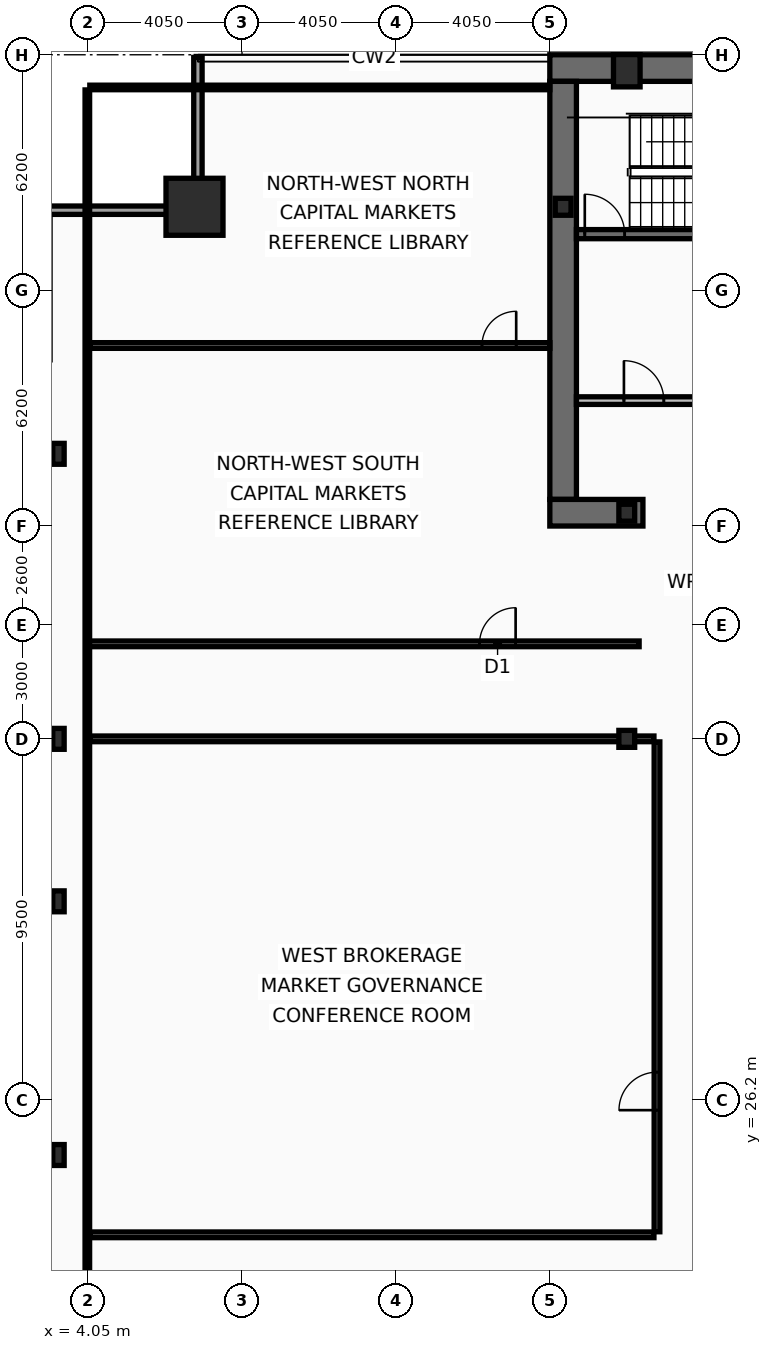
"""IFC4 building model, lengths in metres.
Left out: names, types, materials, properties, quantities, classifications, styles, units other than length and angle.
Written with IfcOpenShell. Run it as: python <this file> out.ifc"""

import sys

from ifc_helpers import new_model, si_unit, direction, frame, frame_2d, origin, origin_2d, place, context, subcontext, project, spatial, rectangle, hollow_rectangle, i_section, extrude, element, fill, save


model = new_model("IFC4")
c1 = context("Model", 3, precision=1e-05, world=origin(), true_north=direction((0.0, 1.0)))
c2 = subcontext(c1, "Body", "Model", "MODEL_VIEW")
j1 = project(units=[si_unit("LENGTHUNIT", "METRE"), si_unit("PLANEANGLEUNIT", "RADIAN")], contexts=[c1])
p1 = place(None, origin())
s1 = spatial("IfcSite", under=j1, at=p1, CompositionType="ELEMENT")
p2 = place(p1, origin())
s2 = spatial("IfcBuilding", under=s1, at=p2, CompositionType="ELEMENT")
p3 = place(p2, frame((0.0, 0.0, 121.8)))
s3 = spatial("IfcBuildingStorey", under=s2, at=p3, CompositionType="ELEMENT", Elevation=121.8)
p4 = place(p3, frame((16.2, 53.35, 0.0), z_axis=(0.0, 0.0, 1.0), x_axis=(1.0, 0.0, 0.0)))
e1 = element("IfcWall", 1, at=p4, inside=s3, PredefinedType="SHEAR", context=c2, shape_type="SweptSolid", body=[
    extrude(rectangle(XDim=40.5, YDim=0.7, at=frame_2d((20.25, 0.0))), origin(), (0.0, 0.0, 1.0), 3.44),
])
p5 = place(p3, frame((16.55, 42.0, 0.0), z_axis=(0.0, 0.0, 1.0), x_axis=(0.0, 1.0, 0.0)))
e2 = element("IfcWall", 2, at=p5, inside=s3, PredefinedType="SHEAR", context=c2, shape_type="SweptSolid", body=[
    extrude(rectangle(XDim=11.0, YDim=0.7, at=frame_2d((5.5, 0.0))), origin(), (0.0, 0.0, 1.0), 3.44),
])
p6 = place(p3, frame((18.65, 41.65, 0.0), z_axis=(0.0, 0.0, 1.0), x_axis=(-1.0, 0.0, 0.0)))
e3 = element("IfcWall", 3, at=p6, inside=s3, PredefinedType="SHEAR", context=c2, shape_type="SweptSolid", body=[
    extrude(rectangle(XDim=2.45, YDim=0.7, at=frame_2d((1.225, 0.0))), origin(), (0.0, 0.0, 1.0), 3.44),
])
p7 = place(p3, frame((16.9, 48.98, 0.0), z_axis=(0.0, 0.0, 1.0), x_axis=(1.0, 0.0, 0.0)))
e4 = element("IfcWall", 4, at=p7, inside=s3, PredefinedType="SHEAR", context=c2, shape_type="SweptSolid", body=[
    extrude(rectangle(XDim=7.32, YDim=0.24, at=frame_2d((3.66, 0.0))), origin(), (0.0, 0.0, 1.0), 3.44),
])
p8 = place(p7, frame((0.22, 0.0, 0.0)))
e5 = element("IfcOpeningElement", 5, at=p8, cuts=e4, PredefinedType="OPENING", context=c2, shape_type="SweptSolid", body=[
    extrude(rectangle(XDim=1.05, YDim=2.15, at=frame_2d((0.525, 1.075))), frame((0.0, 0.13, 0.0), z_axis=(0.0, -1.0, 0.0), x_axis=(1.0, 0.0, 0.0)), (0.0, 0.0, 1.0), 0.26),
])
p9 = place(p3, frame((6.85, 49.7, 0.0), z_axis=(0.0, 0.0, 1.0), x_axis=(1.0, 0.0, 0.0)))
e6 = element("IfcColumn", 6, at=p9, inside=s3, PredefinedType="COLUMN", context=c2, shape_type="SweptSolid", body=[
    extrude(hollow_rectangle(XDim=1.5, YDim=1.5, WallThickness=0.07, at=origin_2d()), origin(), (0.0, 0.0, 1.0), 3.6),
])
p10 = place(p3, frame((18.225, 53.28, 0.0), z_axis=(0.0, 0.0, 1.0), x_axis=(1.0, 0.0, 0.0)))
e7 = element("IfcColumn", 7, at=p10, inside=s3, PredefinedType="COLUMN", context=c2, shape_type="SweptSolid", body=[
    extrude(hollow_rectangle(XDim=0.7, YDim=0.85, WallThickness=0.05, at=origin_2d()), origin(), (0.0, 0.0, 1.0), 3.6),
])
for number, where, z_axis, x_axis in (
    (8, (3.27, 24.75, 0.0), (0.0, 0.0, 1.0), (1.0, 0.0, 0.0)),
    (9, (3.27, 31.425, 0.0), (0.0, 0.0, 1.0), (1.0, 0.0, 0.0)),
    (10, (3.27, 35.7, 0.0), (0.0, 0.0, 1.0), (1.0, 0.0, 0.0)),
    (11, (3.27, 43.2, 0.0), (0.0, 0.0, 1.0), (1.0, 0.0, 0.0)),
):
    element("IfcColumn", number, at=place(p3, frame(where, z_axis=z_axis, x_axis=x_axis)), inside=s3, PredefinedType="COLUMN", context=c2, shape_type="SweptSolid", body=[
        extrude(i_section(OverallWidth=0.3, OverallDepth=0.55, WebThickness=0.015, FlangeThickness=0.029, at=origin_2d()), origin(), (0.0, 0.0, 1.0), 3.6),
    ])
for number, where, z_axis, x_axis in (
    (12, (16.55, 49.7, 0.0), (0.0, 0.0, 1.0), (1.0, 0.0, 0.0)),
    (13, (18.225, 35.7, 0.0), (0.0, 0.0, 1.0), (1.0, 0.0, 0.0)),
    (14, (18.225, 41.65, 0.0), (0.0, 0.0, 1.0), (1.0, 0.0, 0.0)),
):
    element("IfcColumn", number, at=place(p3, frame(where, z_axis=z_axis, x_axis=x_axis)), inside=s3, PredefinedType="COLUMN", context=c2, shape_type="SweptSolid", body=[
        extrude(i_section(OverallWidth=0.416, OverallDepth=0.446, WebThickness=0.039, FlangeThickness=0.063, at=origin_2d()), origin(), (0.0, 0.0, 1.0), 3.6),
    ])
p11 = place(p3, frame((2.83, 49.61, 0.0), z_axis=(0.0, 0.0, 1.0), x_axis=(1.0, 0.0, 0.0)))
e15 = element("IfcWall", 15, at=p11, inside=s3, PredefinedType="SOLIDWALL", context=c2, shape_type="SweptSolid", body=[
    extrude(rectangle(XDim=4.22, YDim=0.22, at=frame_2d((2.11, 0.0))), origin(), (0.0, 0.0, 1.0), 2.83),
])
p12 = place(p3, frame((6.94, 49.72, 0.0), z_axis=(0.0, 0.0, 1.0), x_axis=(0.0, 1.0, 0.0)))
e16 = element("IfcWall", 16, at=p12, inside=s3, PredefinedType="SOLIDWALL", context=c2, shape_type="SweptSolid", body=[
    extrude(rectangle(XDim=3.91, YDim=0.22, at=frame_2d((1.955, 0.0))), origin(), (0.0, 0.0, 1.0), 2.83),
])
p13 = place(p3, frame((16.9, 44.6, 0.0), z_axis=(0.0, 0.0, 1.0), x_axis=(1.0, 0.0, 0.0)))
e17 = element("IfcWall", 17, at=p13, inside=s3, PredefinedType="PARTITIONING", context=c2, shape_type="SweptSolid", body=[
    extrude(rectangle(XDim=4.1, YDim=0.2, at=frame_2d((2.05, 0.0))), origin(), (0.0, 0.0, 1.0), 3.44),
])
p14 = place(p13, frame((1.25, 0.0, 0.0)))
e18 = element("IfcOpeningElement", 18, at=p14, cuts=e17, PredefinedType="OPENING", context=c2, shape_type="SweptSolid", body=[
    extrude(rectangle(XDim=1.05, YDim=2.15, at=frame_2d((0.525, 1.075))), frame((0.0, 0.11, 0.0), z_axis=(0.0, -1.0, 0.0), x_axis=(1.0, 0.0, 0.0)), (0.0, 0.0, 1.0), 0.22),
])
p15 = place(p3, frame((4.03, 38.2, 0.0), z_axis=(0.0, 0.0, 1.0), x_axis=(1.0, 0.0, 0.0)))
e19 = element("IfcWall", 19, at=p15, inside=s3, PredefinedType="PARTITIONING", context=c2, shape_type="SweptSolid", body=[
    extrude(rectangle(XDim=14.52, YDim=0.15, at=frame_2d((7.26, 0.0))), origin(), (0.0, 0.0, 1.0), 2.73),
])
p16 = place(p15, frame((10.32, 0.0, 0.0)))
e20 = element("IfcOpeningElement", 20, at=p16, cuts=e19, PredefinedType="OPENING", context=c2, shape_type="SweptSolid", body=[
    extrude(rectangle(XDim=0.95, YDim=2.05, at=frame_2d((0.475, 1.025))), frame((0.0, 0.085, 0.0), z_axis=(0.0, -1.0, 0.0), x_axis=(1.0, 0.0, 0.0)), (0.0, 0.0, 1.0), 0.17),
])
p17 = place(p3, frame((4.095, 46.05, 0.0), z_axis=(0.0, 0.0, 1.0), x_axis=(1.0, 0.0, 0.0)))
e21 = element("IfcWall", 21, at=p17, inside=s3, PredefinedType="PARTITIONING", context=c2, shape_type="SweptSolid", body=[
    extrude(rectangle(XDim=12.105, YDim=0.15, at=frame_2d((6.052, 0.0))), origin(), (0.0, 0.0, 1.0), 2.83),
])
p18 = place(p17, frame((10.32, 0.0, 0.0)))
e22 = element("IfcOpeningElement", 22, at=p18, cuts=e21, PredefinedType="OPENING", context=c2, shape_type="SweptSolid", body=[
    extrude(rectangle(XDim=0.9, YDim=2.05, at=frame_2d((0.45, 1.025))), frame((0.0, 0.085, 0.0), z_axis=(0.0, -1.0, 0.0), x_axis=(1.0, 0.0, 0.0)), (0.0, 0.0, 1.0), 0.17),
])
p19 = place(p3, frame((19.02, 22.73, 0.0), z_axis=(0.0, 0.0, 1.0), x_axis=(0.0, 1.0, 0.0)))
e23 = element("IfcWall", 23, at=p19, inside=s3, PredefinedType="PARTITIONING", context=c2, shape_type="SweptSolid", body=[
    extrude(rectangle(XDim=12.89, YDim=0.15, at=frame_2d((6.445, 0.0))), origin(), (0.0, 0.0, 1.0), 2.88),
])
p20 = place(p19, frame((3.2, 0.0, 0.0)))
e24 = element("IfcOpeningElement", 24, at=p20, cuts=e23, PredefinedType="OPENING", context=c2, shape_type="SweptSolid", body=[
    extrude(rectangle(XDim=1.0, YDim=2.05, at=frame_2d((0.5, 1.025))), frame((0.0, 0.085, 0.0), z_axis=(0.0, -1.0, 0.0), x_axis=(1.0, 0.0, 0.0)), (0.0, 0.0, 1.0), 0.17),
])
for number, where, z_axis, x_axis in (
    (25, (4.095, 22.65, 0.0), (0.0, 0.0, 1.0), (1.0, 0.0, 0.0)),
    (26, (4.095, 35.7, 0.0), (0.0, 0.0, 1.0), (1.0, 0.0, 0.0)),
):
    element("IfcWall", number, at=place(p3, frame(where, z_axis=z_axis, x_axis=x_axis)), inside=s3, PredefinedType="PARTITIONING", context=c2, shape_type="SweptSolid", body=[
        extrude(rectangle(XDim=14.845, YDim=0.15, at=frame_2d((7.422, 0.0))), origin(), (0.0, 0.0, 1.0), 2.73),
    ])
p21 = place(p3, frame((4.03, 10.665, 0.0), z_axis=(0.0, 0.0, 1.0), x_axis=(0.0, 1.0, 0.0)))
e27 = element("IfcWall", 27, at=p21, inside=s3, PredefinedType="PARTITIONING", context=c2, shape_type="SweptSolid", body=[
    extrude(rectangle(XDim=42.11, YDim=0.12, at=frame_2d((21.055, 0.0))), origin(), (0.0, 0.0, 1.0), 2.73),
])
p22 = place(p3, frame((4.095, 52.84, 0.0), z_axis=(0.0, 0.0, 1.0), x_axis=(1.0, 0.0, 0.0)))
e28 = element("IfcWall", 28, at=p22, inside=s3, PredefinedType="PARTITIONING", context=c2, shape_type="SweptSolid", body=[
    extrude(rectangle(XDim=12.105, YDim=0.12, at=frame_2d((6.052, 0.0))), origin(), (0.0, 0.0, 1.0), 3.44),
])
p23 = place(p8, origin())
e29 = element("IfcDoor", 29, at=p23, inside=s3, OperationType="SINGLE_SWING_LEFT", PredefinedType="DOOR", context=c2, shape_type="SweptSolid", body=[
    extrude(rectangle(XDim=1.05, YDim=2.15, at=frame_2d((0.525, 1.075))), frame((0.0, 0.025, 0.0), z_axis=(0.0, -1.0, 0.0), x_axis=(1.0, 0.0, 0.0)), (0.0, 0.0, 1.0), 0.05),
])
fill(e5, e29)
p24 = place(p14, origin())
e30 = element("IfcDoor", 30, at=p24, inside=s3, OperationType="SINGLE_SWING_LEFT", PredefinedType="DOOR", context=c2, shape_type="SweptSolid", body=[
    extrude(rectangle(XDim=1.05, YDim=2.15, at=frame_2d((0.525, 1.075))), frame((0.0, 0.025, 0.0), z_axis=(0.0, -1.0, 0.0), x_axis=(1.0, 0.0, 0.0)), (0.0, 0.0, 1.0), 0.05),
])
fill(e18, e30)
p25 = place(p16, origin())
e31 = element("IfcDoor", 31, at=p25, inside=s3, OperationType="SINGLE_SWING_RIGHT", PredefinedType="DOOR", context=c2, shape_type="SweptSolid", body=[
    extrude(rectangle(XDim=0.95, YDim=2.05, at=frame_2d((0.475, 1.025))), frame((0.0, 0.025, 0.0), z_axis=(0.0, -1.0, 0.0), x_axis=(1.0, 0.0, 0.0)), (0.0, 0.0, 1.0), 0.05),
])
fill(e20, e31)
p26 = place(p18, origin())
e32 = element("IfcDoor", 32, at=p26, inside=s3, OperationType="SINGLE_SWING_RIGHT", PredefinedType="DOOR", context=c2, shape_type="SweptSolid", body=[
    extrude(rectangle(XDim=0.9, YDim=2.05, at=frame_2d((0.45, 1.025))), frame((0.0, 0.025, 0.0), z_axis=(0.0, -1.0, 0.0), x_axis=(1.0, 0.0, 0.0)), (0.0, 0.0, 1.0), 0.05),
])
fill(e22, e32)
p27 = place(p20, origin())
e33 = element("IfcDoor", 33, at=p27, inside=s3, OperationType="SINGLE_SWING_LEFT", PredefinedType="DOOR", context=c2, shape_type="SweptSolid", body=[
    extrude(rectangle(XDim=1.0, YDim=2.05, at=frame_2d((0.5, 1.025))), frame((0.0, 0.025, 0.0), z_axis=(0.0, -1.0, 0.0), x_axis=(1.0, 0.0, 0.0)), (0.0, 0.0, 1.0), 0.05),
])
fill(e24, e33)
save(model, sys.argv[1])
